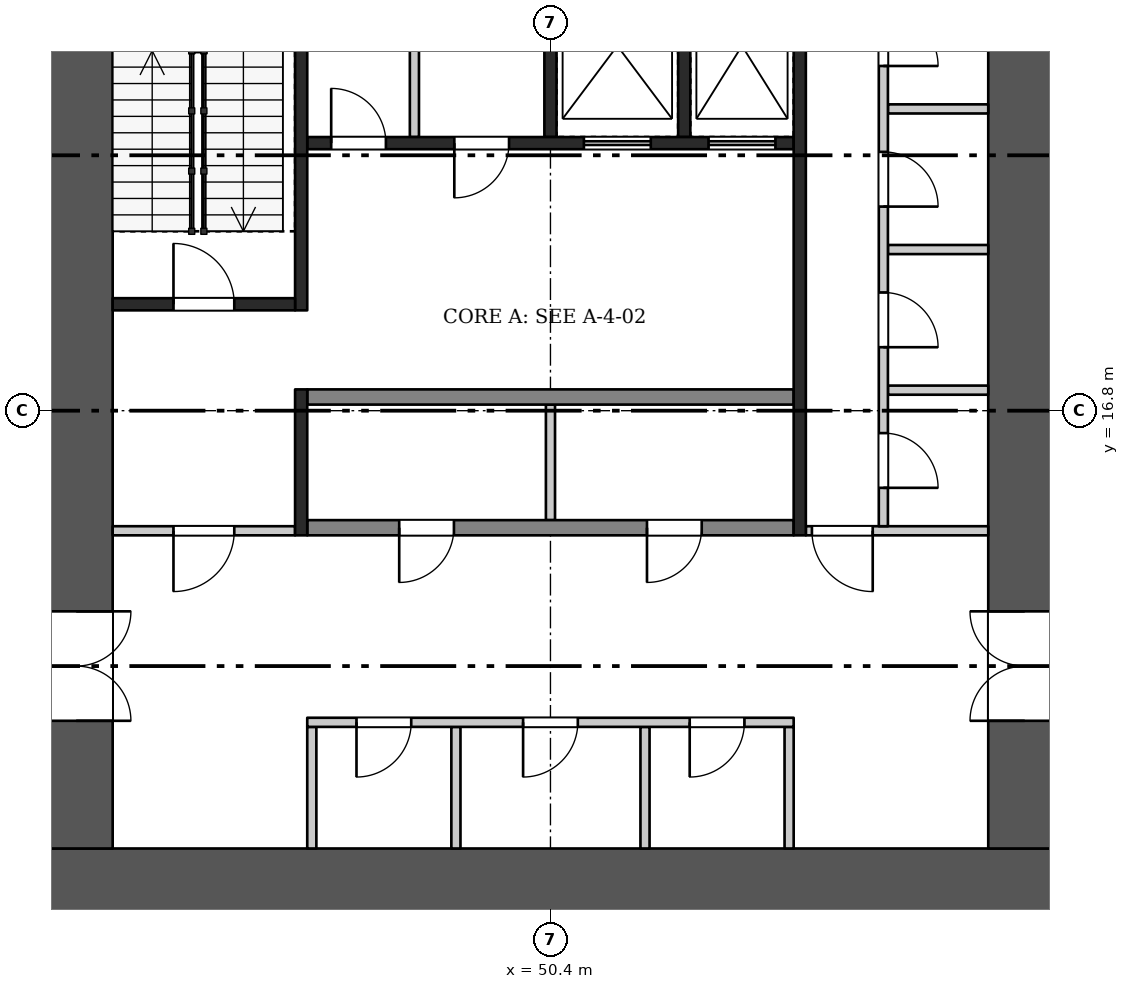
"""IFC4 building model, lengths in metres.
Left out: names, types, materials, properties, quantities, classifications, styles, units other than length and angle.
Written with IfcOpenShell. Run it as: python <this file> out.ifc"""

import sys

from ifc_helpers import new_model, si_unit, direction, frame, frame_2d, origin, place, context, subcontext, project, spatial, rectangle, extrude, element, fill, save


model = new_model("IFC4")
c1 = context("Model", 3, precision=1e-05, world=origin(), true_north=direction((0.0, 1.0)))
c2 = subcontext(c1, "Body", "Model", "MODEL_VIEW")
j1 = project(units=[si_unit("LENGTHUNIT", "METRE"), si_unit("PLANEANGLEUNIT", "RADIAN")], contexts=[c1])
p1 = place(None, origin())
s1 = spatial("IfcSite", under=j1, at=p1, CompositionType="ELEMENT")
p2 = place(p1, origin())
s2 = spatial("IfcBuilding", under=s1, at=p2, CompositionType="ELEMENT")
p3 = place(p2, frame((0.0, 0.0, -12.0)))
s3 = spatial("IfcBuildingStorey", under=s2, at=p3, CompositionType="ELEMENT", Elevation=-12.0)
p4 = place(p3, frame((42.0, 9.0, 0.0), z_axis=(0.0, 0.0, 1.0), x_axis=(1.0, 0.0, 0.0)))
e1 = element("IfcWall", 1, at=p4, inside=s3, PredefinedType="SHEAR", context=c2, shape_type="SweptSolid", body=[
    extrude(rectangle(XDim=16.8, YDim=1.2, at=frame_2d((8.4, 0.0))), origin(), (0.0, 0.0, 1.0), 3.7),
])
p5 = place(p3, frame((42.6, 9.6, 0.0), z_axis=(0.0, 0.0, 1.0), x_axis=(0.0, 1.0, 0.0)))
e2 = element("IfcWall", 2, at=p5, inside=s3, PredefinedType="SHEAR", context=c2, shape_type="SweptSolid", body=[
    extrude(rectangle(XDim=14.4, YDim=1.2, at=frame_2d((7.2, 0.0))), origin(), (0.0, 0.0, 1.0), 3.7),
])
p6 = place(p5, frame((2.1, 0.0, 0.0)))
e3 = element("IfcOpeningElement", 3, at=p6, cuts=e2, PredefinedType="OPENING", context=c2, shape_type="SweptSolid", body=[
    extrude(rectangle(XDim=1.8, YDim=2.1, at=frame_2d((0.9, 1.05))), frame((0.0, 0.61, 0.0), z_axis=(0.0, -1.0, 0.0), x_axis=(1.0, 0.0, 0.0)), (0.0, 0.0, 1.0), 1.22),
])
p7 = place(p3, frame((58.2, 9.6, 0.0), z_axis=(0.0, 0.0, 1.0), x_axis=(0.0, 1.0, 0.0)))
e4 = element("IfcWall", 4, at=p7, inside=s3, PredefinedType="SHEAR", context=c2, shape_type="SweptSolid", body=[
    extrude(rectangle(XDim=14.4, YDim=1.2, at=frame_2d((7.2, 0.0))), origin(), (0.0, 0.0, 1.0), 3.7),
])
p8 = place(p7, frame((2.1, 0.0, 0.0)))
e5 = element("IfcOpeningElement", 5, at=p8, cuts=e4, PredefinedType="OPENING", context=c2, shape_type="SweptSolid", body=[
    extrude(rectangle(XDim=1.8, YDim=2.1, at=frame_2d((0.9, 1.05))), frame((0.0, 0.61, 0.0), z_axis=(0.0, -1.0, 0.0), x_axis=(1.0, 0.0, 0.0)), (0.0, 0.0, 1.0), 1.22),
])
for number, where, z_axis, x_axis in (
    (6, (46.475, 9.6, 0.0), (0.0, 0.0, 1.0), (0.0, 1.0, 0.0)),
    (7, (54.325, 9.6, 0.0), (0.0, 0.0, 1.0), (0.0, 1.0, 0.0)),
    (8, (48.845, 9.6, 0.0), (0.0, 0.0, 1.0), (0.0, 1.0, 0.0)),
    (9, (51.955, 9.6, 0.0), (0.0, 0.0, 1.0), (0.0, 1.0, 0.0)),
):
    element("IfcWall", number, at=place(p3, frame(where, z_axis=z_axis, x_axis=x_axis)), inside=s3, PredefinedType="PARTITIONING", context=c2, shape_type="SweptSolid", body=[
        extrude(rectangle(XDim=2.0, YDim=0.15, at=frame_2d((1.0, 0.0))), origin(), (0.0, 0.0, 1.0), 3.7),
    ])
p9 = place(p3, frame((46.4, 11.675, 0.0), z_axis=(0.0, 0.0, 1.0), x_axis=(1.0, 0.0, 0.0)))
e10 = element("IfcWall", 10, at=p9, inside=s3, PredefinedType="PARTITIONING", context=c2, shape_type="SweptSolid", body=[
    extrude(rectangle(XDim=8.0, YDim=0.15, at=frame_2d((4.0, 0.0))), origin(), (0.0, 0.0, 1.0), 3.7),
])
p10 = place(p9, frame((0.81, 0.0, 0.0)))
e11 = element("IfcOpeningElement", 11, at=p10, cuts=e10, PredefinedType="OPENING", context=c2, shape_type="SweptSolid", body=[
    extrude(rectangle(XDim=0.9, YDim=2.1, at=frame_2d((0.45, 1.05))), frame((0.0, 0.085, 0.0), z_axis=(0.0, -1.0, 0.0), x_axis=(1.0, 0.0, 0.0)), (0.0, 0.0, 1.0), 0.17),
])
p11 = place(p9, frame((3.55, 0.0, 0.0)))
e12 = element("IfcOpeningElement", 12, at=p11, cuts=e10, PredefinedType="OPENING", context=c2, shape_type="SweptSolid", body=[
    extrude(rectangle(XDim=0.9, YDim=2.1, at=frame_2d((0.45, 1.05))), frame((0.0, 0.085, 0.0), z_axis=(0.0, -1.0, 0.0), x_axis=(1.0, 0.0, 0.0)), (0.0, 0.0, 1.0), 0.17),
])
p12 = place(p9, frame((6.29, 0.0, 0.0)))
e13 = element("IfcOpeningElement", 13, at=p12, cuts=e10, PredefinedType="OPENING", context=c2, shape_type="SweptSolid", body=[
    extrude(rectangle(XDim=0.9, YDim=2.1, at=frame_2d((0.45, 1.05))), frame((0.0, 0.085, 0.0), z_axis=(0.0, -1.0, 0.0), x_axis=(1.0, 0.0, 0.0)), (0.0, 0.0, 1.0), 0.17),
])
p13 = place(p3, frame((50.4, 15.0, 0.0), z_axis=(0.0, 0.0, 1.0), x_axis=(0.0, 1.0, 0.0)))
e14 = element("IfcWall", 14, at=p13, inside=s3, PredefinedType="PARTITIONING", context=c2, shape_type="SweptSolid", body=[
    extrude(rectangle(XDim=1.9, YDim=0.15, at=frame_2d((0.95, 0.0))), origin(), (0.0, 0.0, 1.0), 3.7),
])
p14 = place(p3, frame((46.4, 14.875, 0.0), z_axis=(0.0, 0.0, 1.0), x_axis=(1.0, 0.0, 0.0)))
e15 = element("IfcWall", 15, at=p14, inside=s3, PredefinedType="SHEAR", context=c2, shape_type="SweptSolid", body=[
    extrude(rectangle(XDim=8.0, YDim=0.25, at=frame_2d((4.0, 0.0))), origin(), (0.0, 0.0, 1.0), 3.7),
])
p15 = place(p14, frame((1.512, 0.0, 0.0)))
e16 = element("IfcOpeningElement", 16, at=p15, cuts=e15, PredefinedType="OPENING", context=c2, shape_type="SweptSolid", body=[
    extrude(rectangle(XDim=0.9, YDim=2.1, at=frame_2d((0.45, 1.05))), frame((0.0, 0.135, 0.0), z_axis=(0.0, -1.0, 0.0), x_axis=(1.0, 0.0, 0.0)), (0.0, 0.0, 1.0), 0.27),
])
p16 = place(p14, frame((5.587, 0.0, 0.0)))
e17 = element("IfcOpeningElement", 17, at=p16, cuts=e15, PredefinedType="OPENING", context=c2, shape_type="SweptSolid", body=[
    extrude(rectangle(XDim=0.9, YDim=2.1, at=frame_2d((0.45, 1.05))), frame((0.0, 0.135, 0.0), z_axis=(0.0, -1.0, 0.0), x_axis=(1.0, 0.0, 0.0)), (0.0, 0.0, 1.0), 0.27),
])
p17 = place(p3, frame((46.4, 17.025, 0.0), z_axis=(0.0, 0.0, 1.0), x_axis=(1.0, 0.0, 0.0)))
e18 = element("IfcWall", 18, at=p17, inside=s3, PredefinedType="SHEAR", context=c2, shape_type="SweptSolid", body=[
    extrude(rectangle(XDim=8.0, YDim=0.25, at=frame_2d((4.0, 0.0))), origin(), (0.0, 0.0, 1.0), 3.7),
])
for number, where, z_axis, x_axis in (
    (19, (50.4, 21.3, 0.0), (0.0, 0.0, 1.0), (0.0, 1.0, 0.0)),
    (20, (52.6, 21.3, 0.0), (0.0, 0.0, 1.0), (0.0, 1.0, 0.0)),
):
    element("IfcWall", number, at=place(p3, frame(where, z_axis=z_axis, x_axis=x_axis)), inside=s3, PredefinedType="SHEAR", context=c2, shape_type="SweptSolid", body=[
        extrude(rectangle(XDim=2.7, YDim=0.2, at=frame_2d((1.35, 0.0))), origin(), (0.0, 0.0, 1.0), 3.7),
    ])
p18 = place(p3, frame((48.163, 21.3, 0.0), z_axis=(0.0, 0.0, 1.0), x_axis=(0.0, 1.0, 0.0)))
e21 = element("IfcWall", 21, at=p18, inside=s3, PredefinedType="PARTITIONING", context=c2, shape_type="SweptSolid", body=[
    extrude(rectangle(XDim=2.7, YDim=0.15, at=frame_2d((1.35, 0.0))), origin(), (0.0, 0.0, 1.0), 3.7),
])
p19 = place(p3, frame((46.4, 21.2, 0.0), z_axis=(0.0, 0.0, 1.0), x_axis=(1.0, 0.0, 0.0)))
e22 = element("IfcWall", 22, at=p19, inside=s3, PredefinedType="SHEAR", context=c2, shape_type="SweptSolid", body=[
    extrude(rectangle(XDim=8.0, YDim=0.2, at=frame_2d((4.0, 0.0))), origin(), (0.0, 0.0, 1.0), 3.7),
])
p20 = place(p19, frame((0.394, 0.0, 0.0)))
e23 = element("IfcOpeningElement", 23, at=p20, cuts=e22, PredefinedType="OPENING", context=c2, shape_type="SweptSolid", body=[
    extrude(rectangle(XDim=0.9, YDim=2.1, at=frame_2d((0.45, 1.05))), frame((0.0, 0.11, 0.0), z_axis=(0.0, -1.0, 0.0), x_axis=(1.0, 0.0, 0.0)), (0.0, 0.0, 1.0), 0.22),
])
p21 = place(p19, frame((2.419, 0.0, 0.0)))
e24 = element("IfcOpeningElement", 24, at=p21, cuts=e22, PredefinedType="OPENING", context=c2, shape_type="SweptSolid", body=[
    extrude(rectangle(XDim=0.9, YDim=2.1, at=frame_2d((0.45, 1.05))), frame((0.0, 0.11, 0.0), z_axis=(0.0, -1.0, 0.0), x_axis=(1.0, 0.0, 0.0)), (0.0, 0.0, 1.0), 0.22),
])
p22 = place(p19, frame((4.55, 0.0, 0.0)))
e25 = element("IfcOpeningElement", 25, at=p22, cuts=e22, PredefinedType="OPENING", context=c2, shape_type="SweptSolid", body=[
    extrude(rectangle(XDim=1.1, YDim=2.1, at=frame_2d((0.55, 1.05))), frame((0.0, 0.11, 0.0), z_axis=(0.0, -1.0, 0.0), x_axis=(1.0, 0.0, 0.0)), (0.0, 0.0, 1.0), 0.22),
])
p23 = place(p19, frame((6.6, 0.0, 0.0)))
e26 = element("IfcOpeningElement", 26, at=p23, cuts=e22, PredefinedType="OPENING", context=c2, shape_type="SweptSolid", body=[
    extrude(rectangle(XDim=1.1, YDim=2.1, at=frame_2d((0.55, 1.05))), frame((0.0, 0.11, 0.0), z_axis=(0.0, -1.0, 0.0), x_axis=(1.0, 0.0, 0.0)), (0.0, 0.0, 1.0), 0.22),
])
p24 = place(p3, frame((46.3, 14.75, 0.0), z_axis=(0.0, 0.0, 1.0), x_axis=(0.0, 1.0, 0.0)))
e27 = element("IfcWall", 27, at=p24, inside=s3, PredefinedType="SHEAR", context=c2, shape_type="SweptSolid", body=[
    extrude(rectangle(XDim=2.4, YDim=0.2, at=frame_2d((1.2, 0.0))), origin(), (0.0, 0.0, 1.0), 3.7),
])
p25 = place(p3, frame((46.3, 18.45, 0.0), z_axis=(0.0, 0.0, 1.0), x_axis=(0.0, 1.0, 0.0)))
e28 = element("IfcWall", 28, at=p25, inside=s3, PredefinedType="SHEAR", context=c2, shape_type="SweptSolid", body=[
    extrude(rectangle(XDim=5.55, YDim=0.2, at=frame_2d((2.775, 0.0))), origin(), (0.0, 0.0, 1.0), 3.7),
])
p26 = place(p3, frame((43.2, 14.825, 0.0), z_axis=(0.0, 0.0, 1.0), x_axis=(1.0, 0.0, 0.0)))
e29 = element("IfcWall", 29, at=p26, inside=s3, PredefinedType="PARTITIONING", context=c2, shape_type="SweptSolid", body=[
    extrude(rectangle(XDim=3.0, YDim=0.15, at=frame_2d((1.5, 0.0))), origin(), (0.0, 0.0, 1.0), 3.7),
])
p27 = place(p26, frame((1.0, 0.0, 0.0)))
e30 = element("IfcOpeningElement", 30, at=p27, cuts=e29, PredefinedType="OPENING", context=c2, shape_type="SweptSolid", body=[
    extrude(rectangle(XDim=1.0, YDim=2.1, at=frame_2d((0.5, 1.05))), frame((0.0, 0.085, 0.0), z_axis=(0.0, -1.0, 0.0), x_axis=(1.0, 0.0, 0.0)), (0.0, 0.0, 1.0), 0.17),
])
p28 = place(p3, frame((43.2, 18.55, 0.0), z_axis=(0.0, 0.0, 1.0), x_axis=(1.0, 0.0, 0.0)))
e31 = element("IfcWall", 31, at=p28, inside=s3, PredefinedType="SHEAR", context=c2, shape_type="SweptSolid", body=[
    extrude(rectangle(XDim=3.0, YDim=0.2, at=frame_2d((1.5, 0.0))), origin(), (0.0, 0.0, 1.0), 3.7),
])
p29 = place(p28, frame((1.0, 0.0, 0.0)))
e32 = element("IfcOpeningElement", 32, at=p29, cuts=e31, PredefinedType="OPENING", context=c2, shape_type="SweptSolid", body=[
    extrude(rectangle(XDim=1.0, YDim=2.1, at=frame_2d((0.5, 1.05))), frame((0.0, 0.11, 0.0), z_axis=(0.0, -1.0, 0.0), x_axis=(1.0, 0.0, 0.0)), (0.0, 0.0, 1.0), 0.22),
])
p30 = place(p3, frame((54.5, 14.75, 0.0), z_axis=(0.0, 0.0, 1.0), x_axis=(0.0, 1.0, 0.0)))
e33 = element("IfcWall", 33, at=p30, inside=s3, PredefinedType="SHEAR", context=c2, shape_type="SweptSolid", body=[
    extrude(rectangle(XDim=9.25, YDim=0.2, at=frame_2d((4.625, 0.0))), origin(), (0.0, 0.0, 1.0), 3.7),
])
p31 = place(p3, frame((54.6, 14.825, 0.0), z_axis=(0.0, 0.0, 1.0), x_axis=(1.0, 0.0, 0.0)))
e34 = element("IfcWall", 34, at=p31, inside=s3, PredefinedType="PARTITIONING", context=c2, shape_type="SweptSolid", body=[
    extrude(rectangle(XDim=3.0, YDim=0.15, at=frame_2d((1.5, 0.0))), origin(), (0.0, 0.0, 1.0), 3.7),
])
p32 = place(p31, frame((0.1, 0.0, 0.0)))
e35 = element("IfcOpeningElement", 35, at=p32, cuts=e34, PredefinedType="OPENING", context=c2, shape_type="SweptSolid", body=[
    extrude(rectangle(XDim=1.0, YDim=2.1, at=frame_2d((0.5, 1.05))), frame((0.0, 0.085, 0.0), z_axis=(0.0, -1.0, 0.0), x_axis=(1.0, 0.0, 0.0)), (0.0, 0.0, 1.0), 0.17),
])
for number, where, z_axis, x_axis in (
    (36, (55.95, 17.137, 0.0), (0.0, 0.0, 1.0), (1.0, 0.0, 0.0)),
    (37, (55.95, 19.45, 0.0), (0.0, 0.0, 1.0), (1.0, 0.0, 0.0)),
    (38, (55.95, 21.762, 0.0), (0.0, 0.0, 1.0), (1.0, 0.0, 0.0)),
):
    element("IfcWall", number, at=place(p3, frame(where, z_axis=z_axis, x_axis=x_axis)), inside=s3, PredefinedType="PARTITIONING", context=c2, shape_type="SweptSolid", body=[
        extrude(rectangle(XDim=1.65, YDim=0.15, at=frame_2d((0.825, 0.0))), origin(), (0.0, 0.0, 1.0), 3.7),
    ])
p33 = place(p3, frame((55.875, 14.9, 0.0), z_axis=(0.0, 0.0, 1.0), x_axis=(0.0, 1.0, 0.0)))
e39 = element("IfcWall", 39, at=p33, inside=s3, PredefinedType="PARTITIONING", context=c2, shape_type="SweptSolid", body=[
    extrude(rectangle(XDim=9.1, YDim=0.15, at=frame_2d((4.55, 0.0))), origin(), (0.0, 0.0, 1.0), 3.7),
])
p34 = place(p33, frame((0.631, 0.0, 0.0)))
e40 = element("IfcOpeningElement", 40, at=p34, cuts=e39, PredefinedType="OPENING", context=c2, shape_type="SweptSolid", body=[
    extrude(rectangle(XDim=0.9, YDim=2.1, at=frame_2d((0.45, 1.05))), frame((0.0, 0.085, 0.0), z_axis=(0.0, -1.0, 0.0), x_axis=(1.0, 0.0, 0.0)), (0.0, 0.0, 1.0), 0.17),
])
p35 = place(p33, frame((2.944, 0.0, 0.0)))
e41 = element("IfcOpeningElement", 41, at=p35, cuts=e39, PredefinedType="OPENING", context=c2, shape_type="SweptSolid", body=[
    extrude(rectangle(XDim=0.9, YDim=2.1, at=frame_2d((0.45, 1.05))), frame((0.0, 0.085, 0.0), z_axis=(0.0, -1.0, 0.0), x_axis=(1.0, 0.0, 0.0)), (0.0, 0.0, 1.0), 0.17),
])
p36 = place(p33, frame((5.256, 0.0, 0.0)))
e42 = element("IfcOpeningElement", 42, at=p36, cuts=e39, PredefinedType="OPENING", context=c2, shape_type="SweptSolid", body=[
    extrude(rectangle(XDim=0.9, YDim=2.1, at=frame_2d((0.45, 1.05))), frame((0.0, 0.085, 0.0), z_axis=(0.0, -1.0, 0.0), x_axis=(1.0, 0.0, 0.0)), (0.0, 0.0, 1.0), 0.17),
])
p37 = place(p33, frame((7.569, 0.0, 0.0)))
e43 = element("IfcOpeningElement", 43, at=p37, cuts=e39, PredefinedType="OPENING", context=c2, shape_type="SweptSolid", body=[
    extrude(rectangle(XDim=0.9, YDim=2.1, at=frame_2d((0.45, 1.05))), frame((0.0, 0.085, 0.0), z_axis=(0.0, -1.0, 0.0), x_axis=(1.0, 0.0, 0.0)), (0.0, 0.0, 1.0), 0.17),
])
p38 = place(p6, frame((1.8, 0.0, 0.0), z_axis=(0.0, 0.0, 1.0), x_axis=(-1.0, 0.0, 0.0)))
e44 = element("IfcDoor", 44, at=p38, inside=s3, OperationType="DOUBLE_DOOR_SINGLE_SWING", PredefinedType="DOOR", context=c2, shape_type="SweptSolid", body=[
    extrude(rectangle(XDim=1.8, YDim=2.1, at=frame_2d((0.9, 1.05))), frame((0.0, 0.025, 0.0), z_axis=(0.0, -1.0, 0.0), x_axis=(1.0, 0.0, 0.0)), (0.0, 0.0, 1.0), 0.05),
])
fill(e3, e44)
p39 = place(p8, origin())
e45 = element("IfcDoor", 45, at=p39, inside=s3, OperationType="DOUBLE_DOOR_SINGLE_SWING", PredefinedType="DOOR", context=c2, shape_type="SweptSolid", body=[
    extrude(rectangle(XDim=1.8, YDim=2.1, at=frame_2d((0.9, 1.05))), frame((0.0, 0.025, 0.0), z_axis=(0.0, -1.0, 0.0), x_axis=(1.0, 0.0, 0.0)), (0.0, 0.0, 1.0), 0.05),
])
fill(e5, e45)
p40 = place(p10, frame((0.9, 0.0, 0.0), z_axis=(0.0, 0.0, 1.0), x_axis=(-1.0, 0.0, 0.0)))
e46 = element("IfcDoor", 46, at=p40, inside=s3, OperationType="SINGLE_SWING_RIGHT", PredefinedType="DOOR", context=c2, shape_type="SweptSolid", body=[
    extrude(rectangle(XDim=0.9, YDim=2.1, at=frame_2d((0.45, 1.05))), frame((0.0, 0.025, 0.0), z_axis=(0.0, -1.0, 0.0), x_axis=(1.0, 0.0, 0.0)), (0.0, 0.0, 1.0), 0.05),
])
fill(e11, e46)
p41 = place(p11, frame((0.9, 0.0, 0.0), z_axis=(0.0, 0.0, 1.0), x_axis=(-1.0, 0.0, 0.0)))
e47 = element("IfcDoor", 47, at=p41, inside=s3, OperationType="SINGLE_SWING_RIGHT", PredefinedType="DOOR", context=c2, shape_type="SweptSolid", body=[
    extrude(rectangle(XDim=0.9, YDim=2.1, at=frame_2d((0.45, 1.05))), frame((0.0, 0.025, 0.0), z_axis=(0.0, -1.0, 0.0), x_axis=(1.0, 0.0, 0.0)), (0.0, 0.0, 1.0), 0.05),
])
fill(e12, e47)
p42 = place(p12, frame((0.9, 0.0, 0.0), z_axis=(0.0, 0.0, 1.0), x_axis=(-1.0, 0.0, 0.0)))
e48 = element("IfcDoor", 48, at=p42, inside=s3, OperationType="SINGLE_SWING_RIGHT", PredefinedType="DOOR", context=c2, shape_type="SweptSolid", body=[
    extrude(rectangle(XDim=0.9, YDim=2.1, at=frame_2d((0.45, 1.05))), frame((0.0, 0.025, 0.0), z_axis=(0.0, -1.0, 0.0), x_axis=(1.0, 0.0, 0.0)), (0.0, 0.0, 1.0), 0.05),
])
fill(e13, e48)
p43 = place(p15, frame((0.9, 0.0, 0.0), z_axis=(0.0, 0.0, 1.0), x_axis=(-1.0, 0.0, 0.0)))
e49 = element("IfcDoor", 49, at=p43, inside=s3, OperationType="SINGLE_SWING_RIGHT", PredefinedType="DOOR", context=c2, shape_type="SweptSolid", body=[
    extrude(rectangle(XDim=0.9, YDim=2.1, at=frame_2d((0.45, 1.05))), frame((0.0, 0.025, 0.0), z_axis=(0.0, -1.0, 0.0), x_axis=(1.0, 0.0, 0.0)), (0.0, 0.0, 1.0), 0.05),
])
fill(e16, e49)
p44 = place(p16, frame((0.9, 0.0, 0.0), z_axis=(0.0, 0.0, 1.0), x_axis=(-1.0, 0.0, 0.0)))
e50 = element("IfcDoor", 50, at=p44, inside=s3, OperationType="SINGLE_SWING_RIGHT", PredefinedType="DOOR", context=c2, shape_type="SweptSolid", body=[
    extrude(rectangle(XDim=0.9, YDim=2.1, at=frame_2d((0.45, 1.05))), frame((0.0, 0.025, 0.0), z_axis=(0.0, -1.0, 0.0), x_axis=(1.0, 0.0, 0.0)), (0.0, 0.0, 1.0), 0.05),
])
fill(e17, e50)
p45 = place(p20, origin())
e51 = element("IfcDoor", 51, at=p45, inside=s3, OperationType="SINGLE_SWING_LEFT", PredefinedType="DOOR", context=c2, shape_type="SweptSolid", body=[
    extrude(rectangle(XDim=0.9, YDim=2.1, at=frame_2d((0.45, 1.05))), frame((0.0, 0.025, 0.0), z_axis=(0.0, -1.0, 0.0), x_axis=(1.0, 0.0, 0.0)), (0.0, 0.0, 1.0), 0.05),
])
fill(e23, e51)
p46 = place(p21, frame((0.9, 0.0, 0.0), z_axis=(0.0, 0.0, 1.0), x_axis=(-1.0, 0.0, 0.0)))
e52 = element("IfcDoor", 52, at=p46, inside=s3, OperationType="SINGLE_SWING_RIGHT", PredefinedType="DOOR", context=c2, shape_type="SweptSolid", body=[
    extrude(rectangle(XDim=0.9, YDim=2.1, at=frame_2d((0.45, 1.05))), frame((0.0, 0.025, 0.0), z_axis=(0.0, -1.0, 0.0), x_axis=(1.0, 0.0, 0.0)), (0.0, 0.0, 1.0), 0.05),
])
fill(e24, e52)
p47 = place(p22, origin())
e53 = element("IfcDoor", 53, at=p47, inside=s3, OperationType="DOUBLE_DOOR_SLIDING", PredefinedType="DOOR", context=c2, shape_type="SweptSolid", body=[
    extrude(rectangle(XDim=1.1, YDim=2.1, at=frame_2d((0.55, 1.05))), frame((0.0, 0.025, 0.0), z_axis=(0.0, -1.0, 0.0), x_axis=(1.0, 0.0, 0.0)), (0.0, 0.0, 1.0), 0.05),
])
fill(e25, e53)
p48 = place(p23, origin())
e54 = element("IfcDoor", 54, at=p48, inside=s3, OperationType="DOUBLE_DOOR_SLIDING", PredefinedType="DOOR", context=c2, shape_type="SweptSolid", body=[
    extrude(rectangle(XDim=1.1, YDim=2.1, at=frame_2d((0.55, 1.05))), frame((0.0, 0.025, 0.0), z_axis=(0.0, -1.0, 0.0), x_axis=(1.0, 0.0, 0.0)), (0.0, 0.0, 1.0), 0.05),
])
fill(e26, e54)
p49 = place(p27, frame((1.0, 0.0, 0.0), z_axis=(0.0, 0.0, 1.0), x_axis=(-1.0, 0.0, 0.0)))
e55 = element("IfcDoor", 55, at=p49, inside=s3, OperationType="SINGLE_SWING_RIGHT", PredefinedType="DOOR", context=c2, shape_type="SweptSolid", body=[
    extrude(rectangle(XDim=1.0, YDim=2.1, at=frame_2d((0.5, 1.05))), frame((0.0, 0.025, 0.0), z_axis=(0.0, -1.0, 0.0), x_axis=(1.0, 0.0, 0.0)), (0.0, 0.0, 1.0), 0.05),
])
fill(e30, e55)
p50 = place(p29, origin())
e56 = element("IfcDoor", 56, at=p50, inside=s3, OperationType="SINGLE_SWING_LEFT", PredefinedType="DOOR", context=c2, shape_type="SweptSolid", body=[
    extrude(rectangle(XDim=1.0, YDim=2.1, at=frame_2d((0.5, 1.05))), frame((0.0, 0.025, 0.0), z_axis=(0.0, -1.0, 0.0), x_axis=(1.0, 0.0, 0.0)), (0.0, 0.0, 1.0), 0.05),
])
fill(e32, e56)
p51 = place(p32, frame((1.0, 0.0, 0.0), z_axis=(0.0, 0.0, 1.0), x_axis=(-1.0, 0.0, 0.0)))
e57 = element("IfcDoor", 57, at=p51, inside=s3, OperationType="SINGLE_SWING_LEFT", PredefinedType="DOOR", context=c2, shape_type="SweptSolid", body=[
    extrude(rectangle(XDim=1.0, YDim=2.1, at=frame_2d((0.5, 1.05))), frame((0.0, 0.025, 0.0), z_axis=(0.0, -1.0, 0.0), x_axis=(1.0, 0.0, 0.0)), (0.0, 0.0, 1.0), 0.05),
])
fill(e35, e57)
p52 = place(p34, frame((0.9, 0.0, 0.0), z_axis=(0.0, 0.0, 1.0), x_axis=(-1.0, 0.0, 0.0)))
e58 = element("IfcDoor", 58, at=p52, inside=s3, OperationType="SINGLE_SWING_RIGHT", PredefinedType="DOOR", context=c2, shape_type="SweptSolid", body=[
    extrude(rectangle(XDim=0.9, YDim=2.1, at=frame_2d((0.45, 1.05))), frame((0.0, 0.025, 0.0), z_axis=(0.0, -1.0, 0.0), x_axis=(1.0, 0.0, 0.0)), (0.0, 0.0, 1.0), 0.05),
])
fill(e40, e58)
p53 = place(p35, frame((0.9, 0.0, 0.0), z_axis=(0.0, 0.0, 1.0), x_axis=(-1.0, 0.0, 0.0)))
e59 = element("IfcDoor", 59, at=p53, inside=s3, OperationType="SINGLE_SWING_RIGHT", PredefinedType="DOOR", context=c2, shape_type="SweptSolid", body=[
    extrude(rectangle(XDim=0.9, YDim=2.1, at=frame_2d((0.45, 1.05))), frame((0.0, 0.025, 0.0), z_axis=(0.0, -1.0, 0.0), x_axis=(1.0, 0.0, 0.0)), (0.0, 0.0, 1.0), 0.05),
])
fill(e41, e59)
p54 = place(p36, frame((0.9, 0.0, 0.0), z_axis=(0.0, 0.0, 1.0), x_axis=(-1.0, 0.0, 0.0)))
e60 = element("IfcDoor", 60, at=p54, inside=s3, OperationType="SINGLE_SWING_RIGHT", PredefinedType="DOOR", context=c2, shape_type="SweptSolid", body=[
    extrude(rectangle(XDim=0.9, YDim=2.1, at=frame_2d((0.45, 1.05))), frame((0.0, 0.025, 0.0), z_axis=(0.0, -1.0, 0.0), x_axis=(1.0, 0.0, 0.0)), (0.0, 0.0, 1.0), 0.05),
])
fill(e42, e60)
p55 = place(p37, frame((0.9, 0.0, 0.0), z_axis=(0.0, 0.0, 1.0), x_axis=(-1.0, 0.0, 0.0)))
e61 = element("IfcDoor", 61, at=p55, inside=s3, OperationType="SINGLE_SWING_RIGHT", PredefinedType="DOOR", context=c2, shape_type="SweptSolid", body=[
    extrude(rectangle(XDim=0.9, YDim=2.1, at=frame_2d((0.45, 1.05))), frame((0.0, 0.025, 0.0), z_axis=(0.0, -1.0, 0.0), x_axis=(1.0, 0.0, 0.0)), (0.0, 0.0, 1.0), 0.05),
])
fill(e43, e61)
save(model, sys.argv[1])
